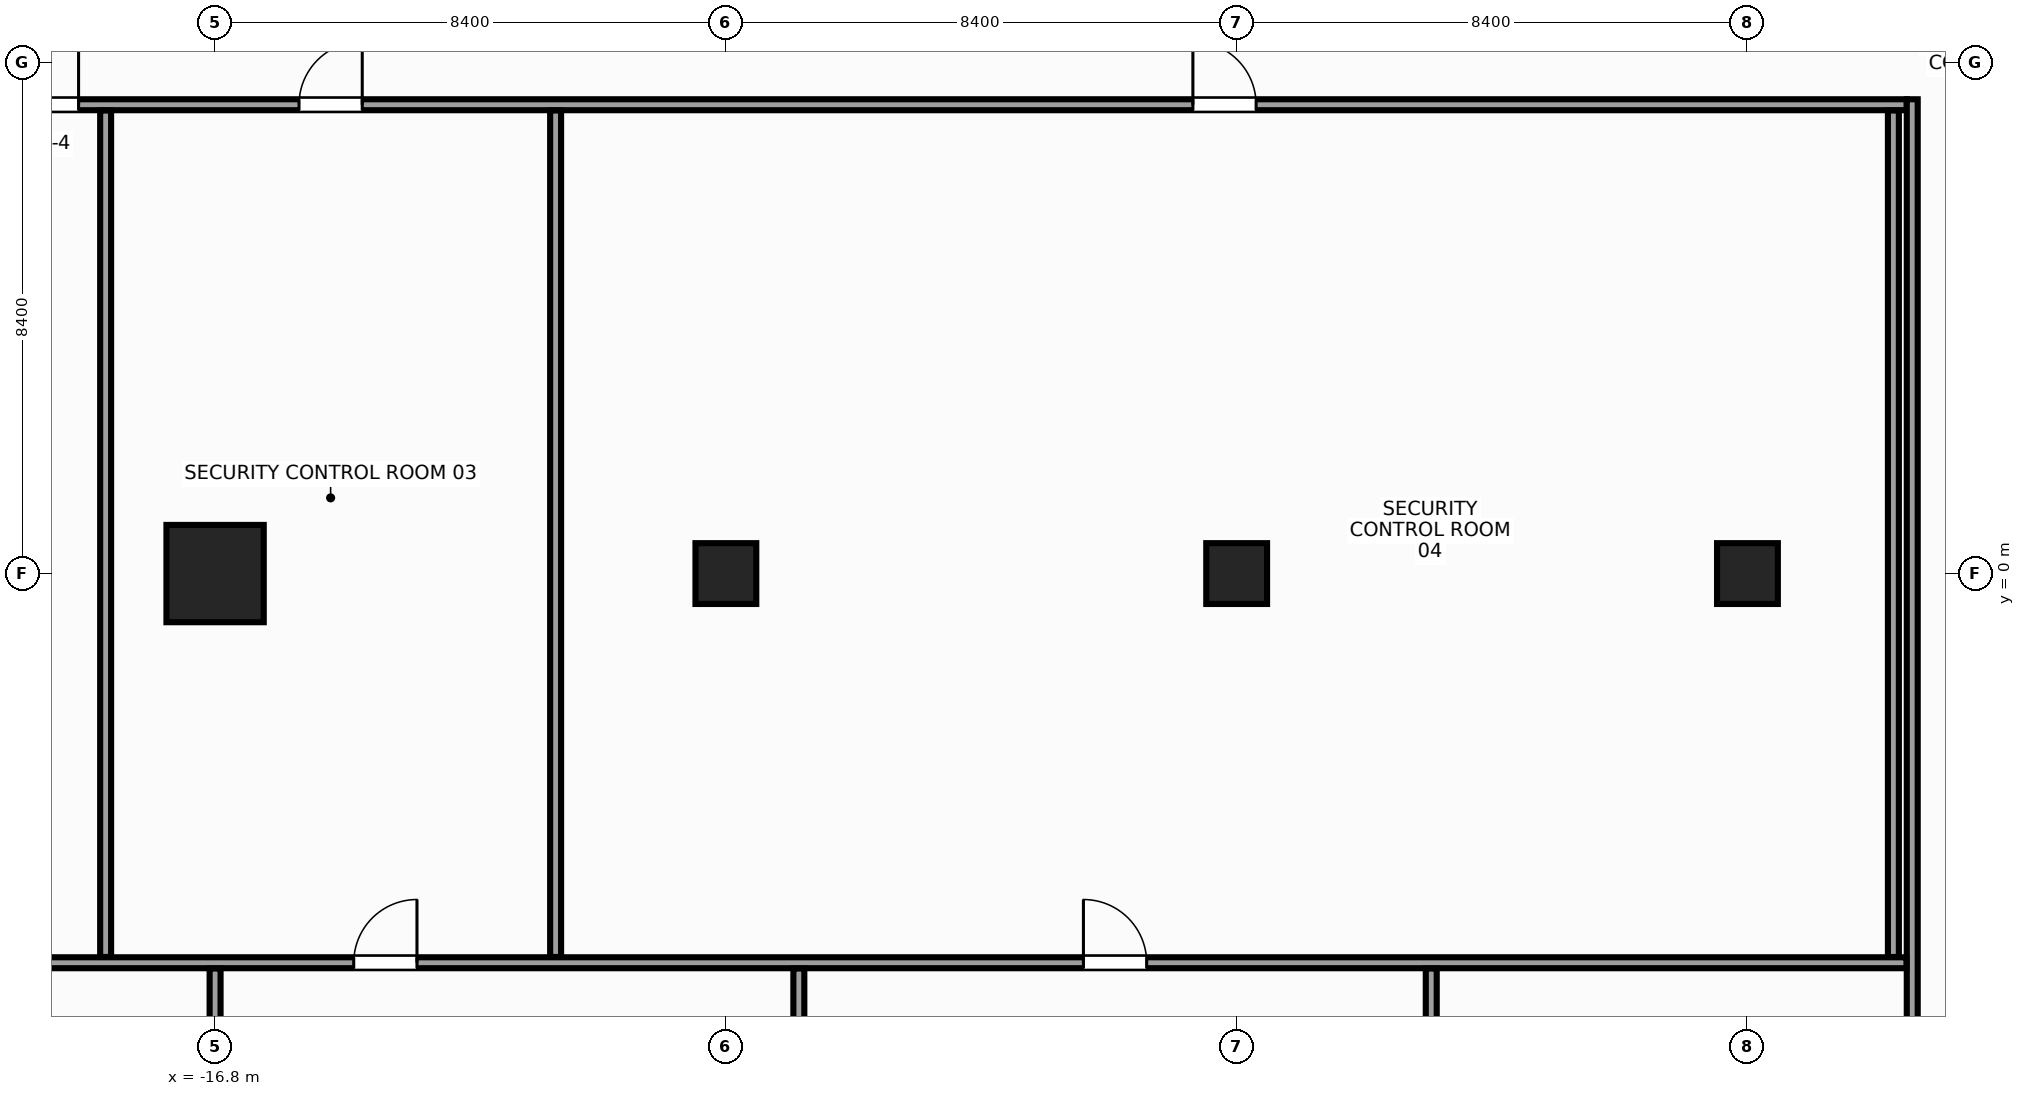
"""IFC4 building model, lengths in metres.
Left out: names, types, materials, properties, quantities, classifications, styles, units other than length and angle.
Written with IfcOpenShell. Run it as: python <this file> out.ifc"""

import sys

from ifc_helpers import new_model, si_unit, direction, frame, frame_2d, origin, origin_with_axes, origin_2d, place, context, subcontext, project, spatial, rectangle, hollow_rectangle, extrude, source, transform, mapped, element, fill, save


model = new_model("IFC4")
c1 = context("Model", 3, precision=1e-05, world=origin(), true_north=direction((0.0, 1.0)))
c2 = subcontext(c1, "Body", "Model", "MODEL_VIEW")
j1 = project(units=[si_unit("LENGTHUNIT", "METRE"), si_unit("PLANEANGLEUNIT", "RADIAN")], contexts=[c1])
p1 = place(None, origin())
s1 = spatial("IfcSite", under=j1, at=p1, CompositionType="ELEMENT")
p2 = place(p1, origin())
s2 = spatial("IfcBuilding", under=s1, at=p2, CompositionType="ELEMENT")
p3 = place(p2, frame((0.0, 0.0, 171.2)))
s3 = spatial("IfcBuildingStorey", under=s2, at=p3, CompositionType="ELEMENT", Elevation=171.2)
m1 = source(origin(), c2, "Body", "SweptSolid", [
    extrude(rectangle(XDim=1.6, YDim=1.6, at=origin_2d()), origin(), (0.0, 0.0, 1.0), 3.6),
])
p4 = place(p3, frame((-16.8, 0.0, 0.0), z_axis=(0.0, 0.0, 1.0), x_axis=(1.0, 0.0, 0.0)))
e1 = element("IfcColumn", 1, at=p4, inside=s3, PredefinedType="COLUMN", context=c2, shape_type="MappedRepresentation", body=[
    mapped(m1, transform((0.0, 0.0, 0.0), x_axis=(1.0, 0.0, 0.0), y_axis=(0.0, 1.0, 0.0), z_axis=(0.0, 0.0, 1.0), scale=1.0)),
])
m2 = source(origin(), c2, "Body", "SweptSolid", [
    extrude(hollow_rectangle(XDim=1.0, YDim=1.0, WallThickness=0.045, at=origin_2d()), origin(), (0.0, 0.0, 1.0), 3.6),
])
for number, where, z_axis, x_axis in (
    (2, (-8.4, 0.0, 0.0), (0.0, 0.0, 1.0), (1.0, 0.0, 0.0)),
    (3, (8.4, 0.0, 0.0), (0.0, 0.0, 1.0), (1.0, 0.0, 0.0)),
):
    element("IfcColumn", number, at=place(p3, frame(where, z_axis=z_axis, x_axis=x_axis)), inside=s3, PredefinedType="COLUMN", context=c2, shape_type="MappedRepresentation", body=[
        mapped(m2, transform((0.0, 0.0, 0.0), x_axis=(1.0, 0.0, 0.0), y_axis=(0.0, 1.0, 0.0), z_axis=(0.0, 0.0, 1.0), scale=1.0)),
    ])
m3 = source(origin(), c2, "Body", "SweptSolid", [
    extrude(rectangle(XDim=1.0, YDim=1.0, at=origin_2d()), origin(), (0.0, 0.0, 1.0), 3.6),
])
p5 = place(p3, origin_with_axes())
e4 = element("IfcColumn", 4, at=p5, inside=s3, PredefinedType="COLUMN", context=c2, shape_type="MappedRepresentation", body=[
    mapped(m3, transform((0.0, 0.0, 0.0), x_axis=(1.0, 0.0, 0.0), y_axis=(0.0, 1.0, 0.0), z_axis=(0.0, 0.0, 1.0), scale=1.0)),
])
m4 = source(origin(), c2, "Body", "SweptSolid", [
    extrude(rectangle(XDim=31.6, YDim=0.18, at=frame_2d((15.8, 0.0))), origin(), (0.0, 0.0, 1.0), 2.765),
])
p6 = place(p3, frame((-20.58, 7.71, 0.0), z_axis=(0.0, 0.0, 1.0), x_axis=(1.0, 0.0, 0.0)))
e5 = element("IfcWall", 5, at=p6, inside=s3, PredefinedType="PARTITIONING", context=c2, shape_type="MappedRepresentation", body=[
    mapped(m4, transform((0.0, 0.0, 0.0), x_axis=(1.0, 0.0, 0.0), y_axis=(0.0, 1.0, 0.0), z_axis=(0.0, 0.0, 1.0), scale=1.0)),
])
p7 = place(p6, frame((0.495, 0.0, 0.0)))
e6 = element("IfcOpeningElement", 6, at=p7, cuts=e5, PredefinedType="OPENING", context=c2, shape_type="SweptSolid", body=[
    extrude(rectangle(XDim=1.04, YDim=2.2, at=frame_2d((0.52, 1.1))), frame((0.0, 0.102, 0.0), z_axis=(0.0, -1.0, 0.0), x_axis=(1.0, 0.0, 0.0)), (0.0, 0.0, 1.0), 0.204),
])
p8 = place(p6, frame((5.16, 0.0, 0.0)))
e7 = element("IfcOpeningElement", 7, at=p8, cuts=e5, PredefinedType="OPENING", context=c2, shape_type="SweptSolid", body=[
    extrude(rectangle(XDim=1.04, YDim=2.2, at=frame_2d((0.52, 1.1))), frame((0.0, 0.102, 0.0), z_axis=(0.0, -1.0, 0.0), x_axis=(1.0, 0.0, 0.0)), (0.0, 0.0, 1.0), 0.204),
])
p9 = place(p6, frame((19.86, 0.0, 0.0)))
e8 = element("IfcOpeningElement", 8, at=p9, cuts=e5, PredefinedType="OPENING", context=c2, shape_type="SweptSolid", body=[
    extrude(rectangle(XDim=1.04, YDim=2.2, at=frame_2d((0.52, 1.1))), frame((0.0, 0.102, 0.0), z_axis=(0.0, -1.0, 0.0), x_axis=(1.0, 0.0, 0.0)), (0.0, 0.0, 1.0), 0.204),
])
m5 = source(origin(), c2, "Body", "SweptSolid", [
    extrude(rectangle(XDim=22.595, YDim=0.18, at=frame_2d((11.297, 0.0))), origin(), (0.0, 0.0, 1.0), 2.665),
])
p10 = place(p3, frame((11.11, -14.795, 0.0), z_axis=(0.0, 0.0, 1.0), x_axis=(0.0, 1.0, 0.0)))
e9 = element("IfcWall", 9, at=p10, inside=s3, PredefinedType="PARTITIONING", context=c2, shape_type="MappedRepresentation", body=[
    mapped(m5, transform((0.0, 0.0, 0.0), x_axis=(1.0, 0.0, 0.0), y_axis=(0.0, 1.0, 0.0), z_axis=(0.0, 0.0, 1.0), scale=1.0)),
])
m6 = source(origin(), c2, "Body", "SweptSolid", [
    extrude(rectangle(XDim=34.865, YDim=0.18, at=frame_2d((17.433, 0.0))), origin(), (0.0, 0.0, 1.0), 2.765),
])
p11 = place(p3, frame((-23.85, -6.4, 0.0), z_axis=(0.0, 0.0, 1.0), x_axis=(1.0, 0.0, 0.0)))
e10 = element("IfcWall", 10, at=p11, inside=s3, PredefinedType="PARTITIONING", context=c2, shape_type="MappedRepresentation", body=[
    mapped(m6, transform((0.0, 0.0, 0.0), x_axis=(1.0, 0.0, 0.0), y_axis=(0.0, 1.0, 0.0), z_axis=(0.0, 0.0, 1.0), scale=1.0)),
])
p12 = place(p11, frame((1.9, 0.0, 0.0)))
e11 = element("IfcOpeningElement", 11, at=p12, cuts=e10, PredefinedType="OPENING", context=c2, shape_type="SweptSolid", body=[
    extrude(rectangle(XDim=1.04, YDim=2.2, at=frame_2d((0.52, 1.1))), frame((0.0, 0.102, 0.0), z_axis=(0.0, -1.0, 0.0), x_axis=(1.0, 0.0, 0.0)), (0.0, 0.0, 1.0), 0.204),
])
p13 = place(p11, frame((9.33, 0.0, 0.0)))
e12 = element("IfcOpeningElement", 12, at=p13, cuts=e10, PredefinedType="OPENING", context=c2, shape_type="SweptSolid", body=[
    extrude(rectangle(XDim=1.04, YDim=2.2, at=frame_2d((0.52, 1.1))), frame((0.0, 0.102, 0.0), z_axis=(0.0, -1.0, 0.0), x_axis=(1.0, 0.0, 0.0)), (0.0, 0.0, 1.0), 0.204),
])
p14 = place(p11, frame((21.33, 0.0, 0.0)))
e13 = element("IfcOpeningElement", 13, at=p14, cuts=e10, PredefinedType="OPENING", context=c2, shape_type="SweptSolid", body=[
    extrude(rectangle(XDim=1.04, YDim=2.2, at=frame_2d((0.52, 1.1))), frame((0.0, 0.102, 0.0), z_axis=(0.0, -1.0, 0.0), x_axis=(1.0, 0.0, 0.0)), (0.0, 0.0, 1.0), 0.204),
])
m7 = source(origin(), c2, "Body", "SweptSolid", [
    extrude(rectangle(XDim=13.92, YDim=0.18, at=frame_2d((6.96, 0.0))), origin(), (0.0, 0.0, 1.0), 2.915),
])
p15 = place(p3, frame((-18.6, -6.305, 0.0), z_axis=(0.0, 0.0, 1.0), x_axis=(0.0, 1.0, 0.0)))
e14 = element("IfcWall", 14, at=p15, inside=s3, PredefinedType="PARTITIONING", context=c2, shape_type="MappedRepresentation", body=[
    mapped(m7, transform((0.0, 0.0, 0.0), x_axis=(1.0, 0.0, 0.0), y_axis=(0.0, 1.0, 0.0), z_axis=(0.0, 0.0, 1.0), scale=1.0)),
])
m8 = source(origin(), c2, "Body", "SweptSolid", [
    extrude(rectangle(XDim=13.92, YDim=0.18, at=frame_2d((6.96, 0.0))), origin(), (0.0, 0.0, 1.0), 2.665),
])
for number, where, z_axis, x_axis in (
    (15, (-11.2, -6.305, 0.0), (0.0, 0.0, 1.0), (0.0, 1.0, 0.0)),
    (16, (10.8, -6.305, 0.0), (0.0, 0.0, 1.0), (0.0, 1.0, 0.0)),
):
    element("IfcWall", number, at=place(p3, frame(where, z_axis=z_axis, x_axis=x_axis)), inside=s3, PredefinedType="PARTITIONING", context=c2, shape_type="MappedRepresentation", body=[
        mapped(m8, transform((0.0, 0.0, 0.0), x_axis=(1.0, 0.0, 0.0), y_axis=(0.0, 1.0, 0.0), z_axis=(0.0, 0.0, 1.0), scale=1.0)),
    ])
m9 = source(origin(), c2, "Body", "SweptSolid", [
    extrude(rectangle(XDim=3.495, YDim=0.18, at=frame_2d((1.748, 0.0))), origin(), (0.0, 0.0, 1.0), 2.765),
])
p16 = place(p3, frame((-16.8, -9.99, 0.0), z_axis=(0.0, 0.0, 1.0), x_axis=(0.0, 1.0, 0.0)))
e17 = element("IfcWall", 17, at=p16, inside=s3, PredefinedType="PARTITIONING", context=c2, shape_type="MappedRepresentation", body=[
    mapped(m9, transform((0.0, 0.0, 0.0), x_axis=(1.0, 0.0, 0.0), y_axis=(0.0, 1.0, 0.0), z_axis=(0.0, 0.0, 1.0), scale=1.0)),
])
m10 = source(origin(), c2, "Body", "SweptSolid", [
    extrude(rectangle(XDim=16.155, YDim=0.18, at=frame_2d((8.077, 0.0))), origin(), (0.0, 0.0, 1.0), 2.915),
])
for number, where, z_axis, x_axis in (
    (18, (-7.2, -22.65, 0.0), (0.0, 0.0, 1.0), (0.0, 1.0, 0.0)),
    (19, (3.2, -22.65, 0.0), (0.0, 0.0, 1.0), (0.0, 1.0, 0.0)),
):
    element("IfcWall", number, at=place(p3, frame(where, z_axis=z_axis, x_axis=x_axis)), inside=s3, PredefinedType="PARTITIONING", context=c2, shape_type="MappedRepresentation", body=[
        mapped(m10, transform((0.0, 0.0, 0.0), x_axis=(1.0, 0.0, 0.0), y_axis=(0.0, 1.0, 0.0), z_axis=(0.0, 0.0, 1.0), scale=1.0)),
    ])
m11 = source(origin(), c2, "Body", "SweptSolid", [
    extrude(rectangle(XDim=1.04, YDim=2.2, at=frame_2d((0.52, 1.1))), frame((0.0, 0.025, 0.0), z_axis=(0.0, -1.0, 0.0), x_axis=(1.0, 0.0, 0.0)), (0.0, 0.0, 1.0), 0.05),
])
p17 = place(p7, origin())
e20 = element("IfcDoor", 20, at=p17, inside=s3, OperationType="SINGLE_SWING_RIGHT", PredefinedType="DOOR", context=c2, shape_type="MappedRepresentation", body=[
    mapped(m11, transform((0.0, 0.0, 0.0), x_axis=(1.0, 0.0, 0.0), y_axis=(0.0, 1.0, 0.0), z_axis=(0.0, 0.0, 1.0), scale=1.0)),
])
fill(e6, e20)
p18 = place(p8, origin())
e21 = element("IfcDoor", 21, at=p18, inside=s3, OperationType="SINGLE_SWING_RIGHT", PredefinedType="DOOR", context=c2, shape_type="MappedRepresentation", body=[
    mapped(m11, transform((0.0, 0.0, 0.0), x_axis=(1.0, 0.0, 0.0), y_axis=(0.0, 1.0, 0.0), z_axis=(0.0, 0.0, 1.0), scale=1.0)),
])
fill(e7, e21)
p19 = place(p9, origin())
e22 = element("IfcDoor", 22, at=p19, inside=s3, OperationType="SINGLE_SWING_LEFT", PredefinedType="DOOR", context=c2, shape_type="MappedRepresentation", body=[
    mapped(m11, transform((0.0, 0.0, 0.0), x_axis=(1.0, 0.0, 0.0), y_axis=(0.0, 1.0, 0.0), z_axis=(0.0, 0.0, 1.0), scale=1.0)),
])
fill(e8, e22)
p20 = place(p13, origin())
e23 = element("IfcDoor", 23, at=p20, inside=s3, OperationType="SINGLE_SWING_RIGHT", PredefinedType="DOOR", context=c2, shape_type="MappedRepresentation", body=[
    mapped(m11, transform((0.0, 0.0, 0.0), x_axis=(1.0, 0.0, 0.0), y_axis=(0.0, 1.0, 0.0), z_axis=(0.0, 0.0, 1.0), scale=1.0)),
])
fill(e12, e23)
p21 = place(p14, origin())
e24 = element("IfcDoor", 24, at=p21, inside=s3, OperationType="SINGLE_SWING_LEFT", PredefinedType="DOOR", context=c2, shape_type="MappedRepresentation", body=[
    mapped(m11, transform((0.0, 0.0, 0.0), x_axis=(1.0, 0.0, 0.0), y_axis=(0.0, 1.0, 0.0), z_axis=(0.0, 0.0, 1.0), scale=1.0)),
])
fill(e13, e24)
save(model, sys.argv[1])
